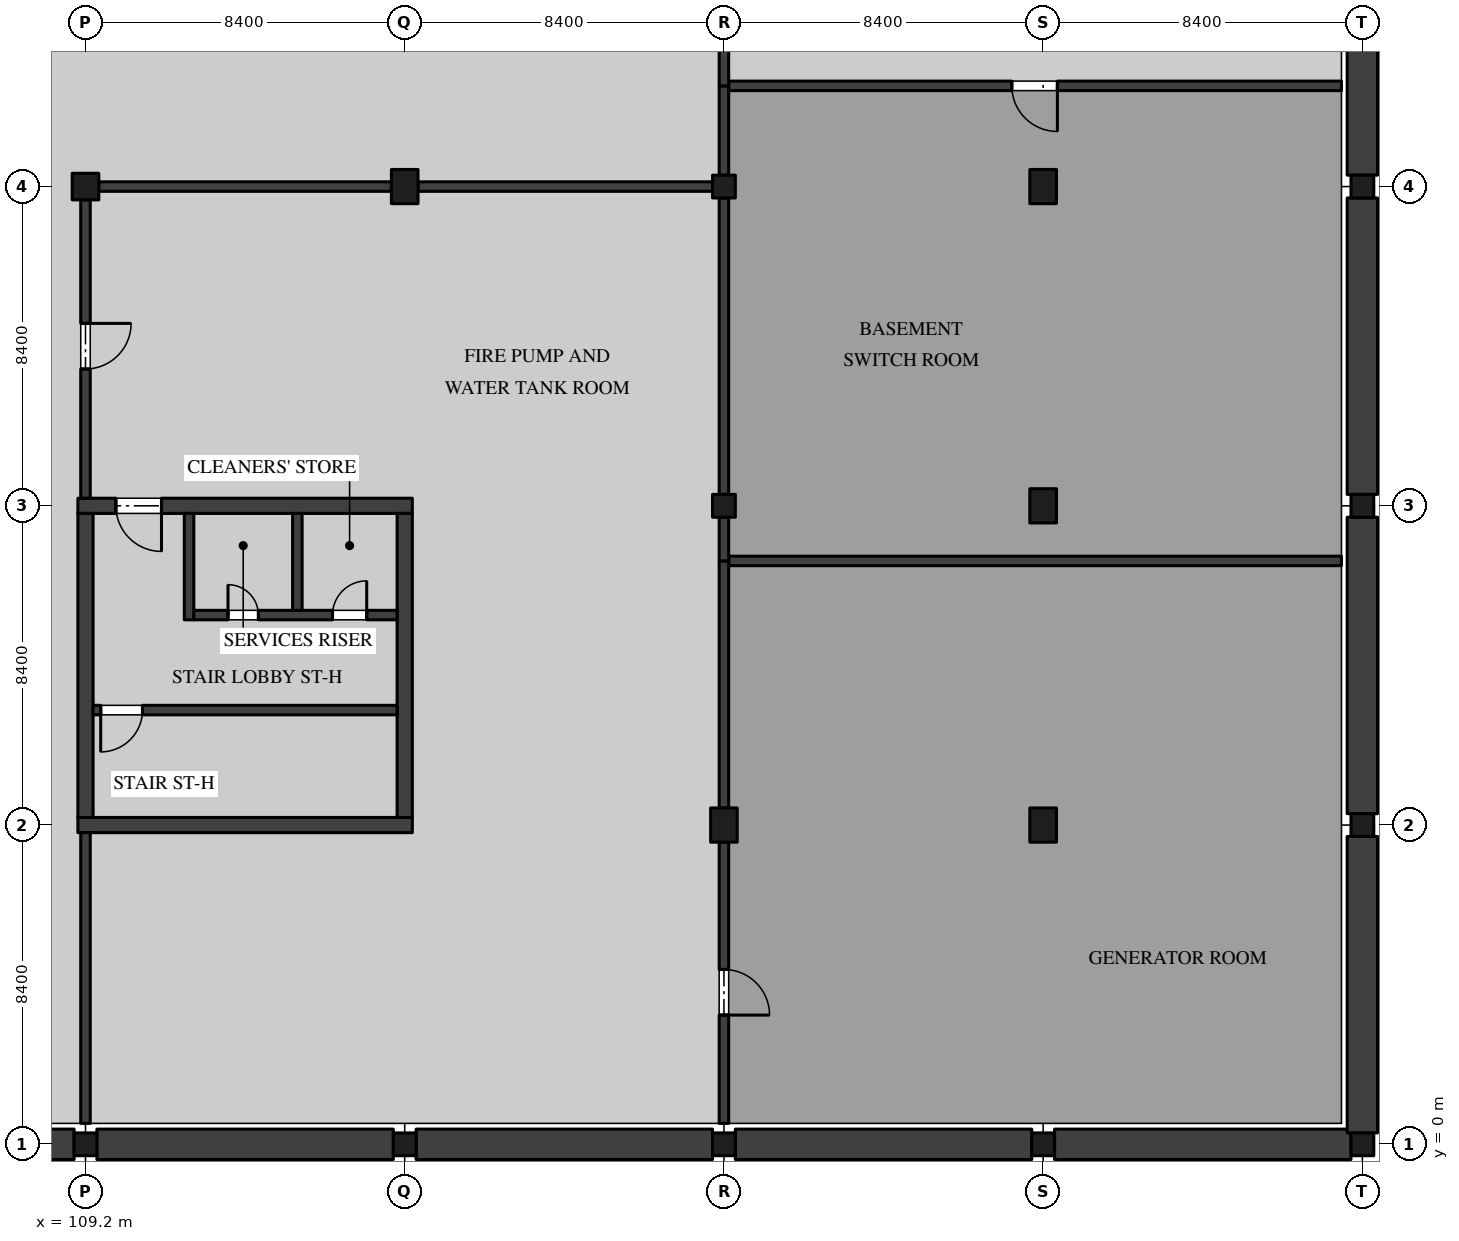
"""IFC4 building model, lengths in metres.
Left out: names, types, materials, properties, quantities, classifications, styles, units other than length and angle.
Written with IfcOpenShell. Run it as: python <this file> out.ifc"""

import sys

from ifc_helpers import new_model, si_unit, direction, frame, frame_2d, origin, origin_2d, place, context, subcontext, project, spatial, rectangle, extrude, element, fill, save


model = new_model("IFC4")
c1 = context("Model", 3, precision=1e-05, world=origin(), true_north=direction((0.0, 1.0)))
c2 = subcontext(c1, "Body", "Model", "MODEL_VIEW")
j1 = project(units=[si_unit("LENGTHUNIT", "METRE"), si_unit("PLANEANGLEUNIT", "RADIAN")], contexts=[c1])
p1 = place(None, origin())
s1 = spatial("IfcSite", under=j1, at=p1, CompositionType="ELEMENT")
p2 = place(p1, origin())
s2 = spatial("IfcBuilding", under=s1, at=p2, CompositionType="ELEMENT")
p3 = place(p2, frame((0.0, 0.0, -4.5)))
s3 = spatial("IfcBuildingStorey", under=s2, at=p3, CompositionType="ELEMENT", Elevation=-4.5)
p4 = place(p3, frame((109.2, 0.0, 0.0), z_axis=(0.0, 0.0, 1.0), x_axis=(1.0, 0.0, 0.0)))
e1 = element("IfcColumn", 1, at=p4, inside=s3, PredefinedType="COLUMN", context=c2, shape_type="SweptSolid", body=[
    extrude(rectangle(XDim=0.6, YDim=0.6, at=origin_2d()), origin(), (0.0, 0.0, 1.0), 4.05),
])
p5 = place(p3, frame((109.2, 25.2, 0.0), z_axis=(0.0, 0.0, 1.0), x_axis=(1.0, 0.0, 0.0)))
e2 = element("IfcColumn", 2, at=p5, inside=s3, PredefinedType="COLUMN", context=c2, shape_type="SweptSolid", body=[
    extrude(rectangle(XDim=0.7, YDim=0.7, at=origin_2d()), origin(), (0.0, 0.0, 1.0), 4.05),
])
p6 = place(p3, frame((117.6, 0.0, 0.0), z_axis=(0.0, 0.0, 1.0), x_axis=(1.0, 0.0, 0.0)))
e3 = element("IfcColumn", 3, at=p6, inside=s3, PredefinedType="COLUMN", context=c2, shape_type="SweptSolid", body=[
    extrude(rectangle(XDim=0.6, YDim=0.6, at=origin_2d()), origin(), (0.0, 0.0, 1.0), 4.05),
])
p7 = place(p3, frame((117.6, 25.2, 0.0), z_axis=(0.0, 0.0, 1.0), x_axis=(1.0, 0.0, 0.0)))
e4 = element("IfcColumn", 4, at=p7, inside=s3, PredefinedType="COLUMN", context=c2, shape_type="SweptSolid", body=[
    extrude(rectangle(XDim=0.7, YDim=0.9, at=origin_2d()), origin(), (0.0, 0.0, 1.0), 4.05),
])
p8 = place(p3, frame((126.0, 0.0, 0.0), z_axis=(0.0, 0.0, 1.0), x_axis=(1.0, 0.0, 0.0)))
e5 = element("IfcColumn", 5, at=p8, inside=s3, PredefinedType="COLUMN", context=c2, shape_type="SweptSolid", body=[
    extrude(rectangle(XDim=0.6, YDim=0.6, at=origin_2d()), origin(), (0.0, 0.0, 1.0), 4.05),
])
p9 = place(p3, frame((126.0, 8.4, 0.0), z_axis=(0.0, 0.0, 1.0), x_axis=(1.0, 0.0, 0.0)))
e6 = element("IfcColumn", 6, at=p9, inside=s3, PredefinedType="COLUMN", context=c2, shape_type="SweptSolid", body=[
    extrude(rectangle(XDim=0.7, YDim=0.9, at=origin_2d()), origin(), (0.0, 0.0, 1.0), 4.05),
])
for number, where, z_axis, x_axis in (
    (7, (126.0, 16.8, 0.0), (0.0, 0.0, 1.0), (1.0, 0.0, 0.0)),
    (8, (126.0, 25.2, 0.0), (0.0, 0.0, 1.0), (1.0, 0.0, 0.0)),
    (9, (134.4, 0.0, 0.0), (0.0, 0.0, 1.0), (1.0, 0.0, 0.0)),
):
    element("IfcColumn", number, at=place(p3, frame(where, z_axis=z_axis, x_axis=x_axis)), inside=s3, PredefinedType="COLUMN", context=c2, shape_type="SweptSolid", body=[
        extrude(rectangle(XDim=0.6, YDim=0.6, at=origin_2d()), origin(), (0.0, 0.0, 1.0), 4.05),
    ])
for number, where, z_axis, x_axis in (
    (10, (134.4, 8.4, 0.0), (0.0, 0.0, 1.0), (1.0, 0.0, 0.0)),
    (11, (134.4, 16.8, 0.0), (0.0, 0.0, 1.0), (1.0, 0.0, 0.0)),
    (12, (134.4, 25.2, 0.0), (0.0, 0.0, 1.0), (1.0, 0.0, 0.0)),
):
    element("IfcColumn", number, at=place(p3, frame(where, z_axis=z_axis, x_axis=x_axis)), inside=s3, PredefinedType="COLUMN", context=c2, shape_type="SweptSolid", body=[
        extrude(rectangle(XDim=0.7, YDim=0.9, at=origin_2d()), origin(), (0.0, 0.0, 1.0), 4.05),
    ])
for number, where, z_axis, x_axis in (
    (13, (142.8, 0.0, 0.0), (0.0, 0.0, 1.0), (1.0, 0.0, 0.0)),
    (14, (142.8, 8.4, 0.0), (0.0, 0.0, 1.0), (1.0, 0.0, 0.0)),
    (15, (142.8, 16.8, 0.0), (0.0, 0.0, 1.0), (1.0, 0.0, 0.0)),
    (16, (142.8, 25.2, 0.0), (0.0, 0.0, 1.0), (1.0, 0.0, 0.0)),
):
    element("IfcColumn", number, at=place(p3, frame(where, z_axis=z_axis, x_axis=x_axis)), inside=s3, PredefinedType="COLUMN", context=c2, shape_type="SweptSolid", body=[
        extrude(rectangle(XDim=0.6, YDim=0.6, at=origin_2d()), origin(), (0.0, 0.0, 1.0), 4.05),
    ])
p10 = place(p3, frame((101.1, 0.0, 0.0), z_axis=(0.0, 0.0, 1.0), x_axis=(1.0, 0.0, 0.0)))
e17 = element("IfcWall", 17, at=p10, inside=s3, PredefinedType="SOLIDWALL", context=c2, shape_type="SweptSolid", body=[
    extrude(rectangle(XDim=7.8, YDim=0.8, at=frame_2d((3.9, 0.0))), origin(), (0.0, 0.0, 1.0), 4.05),
])
for number, where, z_axis, x_axis in (
    (18, (109.5, 0.0, 0.0), (0.0, 0.0, 1.0), (1.0, 0.0, 0.0)),
    (19, (117.9, 0.0, 0.0), (0.0, 0.0, 1.0), (1.0, 0.0, 0.0)),
    (20, (126.3, 0.0, 0.0), (0.0, 0.0, 1.0), (1.0, 0.0, 0.0)),
    (21, (134.7, 0.0, 0.0), (0.0, 0.0, 1.0), (1.0, 0.0, 0.0)),
    (22, (142.8, 0.3, 0.0), (0.0, 0.0, 1.0), (0.0, 1.0, 0.0)),
    (23, (142.8, 8.7, 0.0), (0.0, 0.0, 1.0), (0.0, 1.0, 0.0)),
):
    element("IfcWall", number, at=place(p3, frame(where, z_axis=z_axis, x_axis=x_axis)), inside=s3, PredefinedType="SOLIDWALL", context=c2, shape_type="SweptSolid", body=[
        extrude(rectangle(XDim=7.8, YDim=0.8, at=frame_2d((3.9, 0.0))), origin(), (0.0, 0.0, 1.0), 4.05),
    ])
p11 = place(p3, frame((142.8, 17.1, 0.0), z_axis=(0.0, 0.0, 1.0), x_axis=(0.0, 1.0, 0.0)))
e24 = element("IfcWall", 24, at=p11, inside=s3, PredefinedType="SOLIDWALL", context=c2, shape_type="SweptSolid", body=[
    extrude(rectangle(XDim=7.8, YDim=0.8, at=frame_2d((3.9, 0.0))), origin(), (0.0, 0.0, 1.0), 4.05),
])
p12 = place(p3, frame((142.8, 25.5, 0.0), z_axis=(0.0, 0.0, 1.0), x_axis=(0.0, 1.0, 0.0)))
e25 = element("IfcWall", 25, at=p12, inside=s3, PredefinedType="SOLIDWALL", context=c2, shape_type="SweptSolid", body=[
    extrude(rectangle(XDim=7.8, YDim=0.8, at=frame_2d((3.9, 0.0))), origin(), (0.0, 0.0, 1.0), 4.05),
])
p13 = place(p3, frame((109.0, 8.4, 0.0), z_axis=(0.0, 0.0, 1.0), x_axis=(1.0, 0.0, 0.0)))
e26 = element("IfcWall", 26, at=p13, inside=s3, PredefinedType="SHEAR", context=c2, shape_type="SweptSolid", body=[
    extrude(rectangle(XDim=8.8, YDim=0.4, at=frame_2d((4.4, 0.0))), origin(), (0.0, 0.0, 1.0), 4.05),
])
p14 = place(p3, frame((109.0, 16.8, 0.0), z_axis=(0.0, 0.0, 1.0), x_axis=(1.0, 0.0, 0.0)))
e27 = element("IfcWall", 27, at=p14, inside=s3, PredefinedType="SHEAR", context=c2, shape_type="SweptSolid", body=[
    extrude(rectangle(XDim=8.8, YDim=0.4, at=frame_2d((4.4, 0.0))), origin(), (0.0, 0.0, 1.0), 4.05),
])
p15 = place(p14, frame((1.0, 0.0, 0.0)))
e28 = element("IfcOpeningElement", 28, at=p15, cuts=e27, PredefinedType="OPENING", context=c2, shape_type="SweptSolid", body=[
    extrude(rectangle(XDim=1.2, YDim=2.1, at=frame_2d((0.6, 1.05))), frame((0.0, 0.21, 0.0), z_axis=(0.0, -1.0, 0.0), x_axis=(1.0, 0.0, 0.0)), (0.0, 0.0, 1.0), 0.42),
])
for number, where, z_axis, x_axis in (
    (29, (109.2, 8.6, 0.0), (0.0, 0.0, 1.0), (0.0, 1.0, 0.0)),
    (30, (117.6, 8.6, 0.0), (0.0, 0.0, 1.0), (0.0, 1.0, 0.0)),
):
    element("IfcWall", number, at=place(p3, frame(where, z_axis=z_axis, x_axis=x_axis)), inside=s3, PredefinedType="SHEAR", context=c2, shape_type="SweptSolid", body=[
        extrude(rectangle(XDim=8.0, YDim=0.4, at=frame_2d((4.0, 0.0))), origin(), (0.0, 0.0, 1.0), 4.05),
    ])
p16 = place(p3, frame((109.4, 11.425, 0.0), z_axis=(0.0, 0.0, 1.0), x_axis=(1.0, 0.0, 0.0)))
e31 = element("IfcWall", 31, at=p16, inside=s3, PredefinedType="SOLIDWALL", context=c2, shape_type="SweptSolid", body=[
    extrude(rectangle(XDim=8.0, YDim=0.25, at=frame_2d((4.0, 0.0))), origin(), (0.0, 0.0, 1.0), 4.05),
])
p17 = place(p16, frame((0.2, 0.0, 0.0)))
e32 = element("IfcOpeningElement", 32, at=p17, cuts=e31, PredefinedType="OPENING", context=c2, shape_type="SweptSolid", body=[
    extrude(rectangle(XDim=1.1, YDim=2.1, at=frame_2d((0.55, 1.05))), frame((0.0, 0.135, 0.0), z_axis=(0.0, -1.0, 0.0), x_axis=(1.0, 0.0, 0.0)), (0.0, 0.0, 1.0), 0.27),
])
p18 = place(p3, frame((111.925, 13.8, 0.0), z_axis=(0.0, 0.0, 1.0), x_axis=(0.0, 1.0, 0.0)))
e33 = element("IfcWall", 33, at=p18, inside=s3, PredefinedType="SOLIDWALL", context=c2, shape_type="SweptSolid", body=[
    extrude(rectangle(XDim=2.8, YDim=0.25, at=frame_2d((1.4, 0.0))), origin(), (0.0, 0.0, 1.0), 4.05),
])
p19 = place(p3, frame((112.05, 13.925, 0.0), z_axis=(0.0, 0.0, 1.0), x_axis=(1.0, 0.0, 0.0)))
e34 = element("IfcWall", 34, at=p19, inside=s3, PredefinedType="SOLIDWALL", context=c2, shape_type="SweptSolid", body=[
    extrude(rectangle(XDim=5.35, YDim=0.25, at=frame_2d((2.675, 0.0))), origin(), (0.0, 0.0, 1.0), 4.05),
])
p20 = place(p19, frame((3.65, 0.0, 0.0)))
e35 = element("IfcOpeningElement", 35, at=p20, cuts=e34, PredefinedType="OPENING", context=c2, shape_type="SweptSolid", body=[
    extrude(rectangle(XDim=0.9, YDim=2.1, at=frame_2d((0.45, 1.05))), frame((0.0, 0.135, 0.0), z_axis=(0.0, -1.0, 0.0), x_axis=(1.0, 0.0, 0.0)), (0.0, 0.0, 1.0), 0.27),
])
p21 = place(p19, frame((0.9, 0.0, 0.0)))
e36 = element("IfcOpeningElement", 36, at=p21, cuts=e34, PredefinedType="OPENING", context=c2, shape_type="SweptSolid", body=[
    extrude(rectangle(XDim=0.8, YDim=2.1, at=frame_2d((0.4, 1.05))), frame((0.0, 0.135, 0.0), z_axis=(0.0, -1.0, 0.0), x_axis=(1.0, 0.0, 0.0)), (0.0, 0.0, 1.0), 0.27),
])
p22 = place(p3, frame((114.775, 14.05, 0.0), z_axis=(0.0, 0.0, 1.0), x_axis=(0.0, 1.0, 0.0)))
e37 = element("IfcWall", 37, at=p22, inside=s3, PredefinedType="SOLIDWALL", context=c2, shape_type="SweptSolid", body=[
    extrude(rectangle(XDim=2.55, YDim=0.25, at=frame_2d((1.275, 0.0))), origin(), (0.0, 0.0, 1.0), 4.05),
])
p23 = place(p3, frame((126.125, 15.35, 0.0), z_axis=(0.0, 0.0, 1.0), x_axis=(1.0, 0.0, 0.0)))
e38 = element("IfcWall", 38, at=p23, inside=s3, PredefinedType="PARTITIONING", context=c2, shape_type="SweptSolid", body=[
    extrude(rectangle(XDim=16.125, YDim=0.25, at=frame_2d((8.062, 0.0))), origin(), (0.0, 0.0, 1.0), 4.05),
])
p24 = place(p3, frame((126.0, 0.55, 0.0), z_axis=(0.0, 0.0, 1.0), x_axis=(0.0, 1.0, 0.0)))
e39 = element("IfcWall", 39, at=p24, inside=s3, PredefinedType="PARTITIONING", context=c2, shape_type="SweptSolid", body=[
    extrude(rectangle(XDim=7.4, YDim=0.25, at=frame_2d((3.7, 0.0))), origin(), (0.0, 0.0, 1.0), 4.05),
])
p25 = place(p24, frame((2.85, 0.0, 0.0)))
e40 = element("IfcOpeningElement", 40, at=p25, cuts=e39, PredefinedType="OPENING", context=c2, shape_type="SweptSolid", body=[
    extrude(rectangle(XDim=1.2, YDim=2.1, at=frame_2d((0.6, 1.05))), frame((0.0, 0.135, 0.0), z_axis=(0.0, -1.0, 0.0), x_axis=(1.0, 0.0, 0.0)), (0.0, 0.0, 1.0), 0.27),
])
p26 = place(p3, frame((126.0, 8.85, 0.0), z_axis=(0.0, 0.0, 1.0), x_axis=(0.0, 1.0, 0.0)))
e41 = element("IfcWall", 41, at=p26, inside=s3, PredefinedType="PARTITIONING", context=c2, shape_type="SweptSolid", body=[
    extrude(rectangle(XDim=6.5, YDim=0.25, at=frame_2d((3.25, 0.0))), origin(), (0.0, 0.0, 1.0), 4.05),
])
p27 = place(p3, frame((126.125, 27.85, 0.0), z_axis=(0.0, 0.0, 1.0), x_axis=(1.0, 0.0, 0.0)))
e42 = element("IfcWall", 42, at=p27, inside=s3, PredefinedType="PARTITIONING", context=c2, shape_type="SweptSolid", body=[
    extrude(rectangle(XDim=16.125, YDim=0.25, at=frame_2d((8.062, 0.0))), origin(), (0.0, 0.0, 1.0), 4.05),
])
p28 = place(p27, frame((7.45, 0.0, 0.0)))
e43 = element("IfcOpeningElement", 43, at=p28, cuts=e42, PredefinedType="OPENING", context=c2, shape_type="SweptSolid", body=[
    extrude(rectangle(XDim=1.2, YDim=2.1, at=frame_2d((0.6, 1.05))), frame((0.0, 0.135, 0.0), z_axis=(0.0, -1.0, 0.0), x_axis=(1.0, 0.0, 0.0)), (0.0, 0.0, 1.0), 0.27),
])
p29 = place(p3, frame((126.0, 15.35, 0.0), z_axis=(0.0, 0.0, 1.0), x_axis=(0.0, 1.0, 0.0)))
e44 = element("IfcWall", 44, at=p29, inside=s3, PredefinedType="PARTITIONING", context=c2, shape_type="SweptSolid", body=[
    extrude(rectangle(XDim=1.15, YDim=0.25, at=frame_2d((0.575, 0.0))), origin(), (0.0, 0.0, 1.0), 4.05),
])
p30 = place(p3, frame((126.0, 17.1, 0.0), z_axis=(0.0, 0.0, 1.0), x_axis=(0.0, 1.0, 0.0)))
e45 = element("IfcWall", 45, at=p30, inside=s3, PredefinedType="PARTITIONING", context=c2, shape_type="SweptSolid", body=[
    extrude(rectangle(XDim=7.8, YDim=0.25, at=frame_2d((3.9, 0.0))), origin(), (0.0, 0.0, 1.0), 4.05),
])
p31 = place(p3, frame((126.0, 25.5, 0.0), z_axis=(0.0, 0.0, 1.0), x_axis=(0.0, 1.0, 0.0)))
e46 = element("IfcWall", 46, at=p31, inside=s3, PredefinedType="PARTITIONING", context=c2, shape_type="SweptSolid", body=[
    extrude(rectangle(XDim=2.35, YDim=0.25, at=frame_2d((1.175, 0.0))), origin(), (0.0, 0.0, 1.0), 4.05),
])
p32 = place(p3, frame((126.0, 27.85, 0.0), z_axis=(0.0, 0.0, 1.0), x_axis=(0.0, 1.0, 0.0)))
e47 = element("IfcWall", 47, at=p32, inside=s3, PredefinedType="PARTITIONING", context=c2, shape_type="SweptSolid", body=[
    extrude(rectangle(XDim=5.2, YDim=0.25, at=frame_2d((2.6, 0.0))), origin(), (0.0, 0.0, 1.0), 4.05),
])
p33 = place(p3, frame((109.2, 0.55, 0.0), z_axis=(0.0, 0.0, 1.0), x_axis=(0.0, 1.0, 0.0)))
e48 = element("IfcWall", 48, at=p33, inside=s3, PredefinedType="PARTITIONING", context=c2, shape_type="SweptSolid", body=[
    extrude(rectangle(XDim=7.65, YDim=0.25, at=frame_2d((3.825, 0.0))), origin(), (0.0, 0.0, 1.0), 4.05),
])
p34 = place(p3, frame((109.2, 17.0, 0.0), z_axis=(0.0, 0.0, 1.0), x_axis=(0.0, 1.0, 0.0)))
e49 = element("IfcWall", 49, at=p34, inside=s3, PredefinedType="PARTITIONING", context=c2, shape_type="SweptSolid", body=[
    extrude(rectangle(XDim=7.85, YDim=0.25, at=frame_2d((3.925, 0.0))), origin(), (0.0, 0.0, 1.0), 4.05),
])
p35 = place(p34, frame((3.4, 0.0, 0.0)))
e50 = element("IfcOpeningElement", 50, at=p35, cuts=e49, PredefinedType="OPENING", context=c2, shape_type="SweptSolid", body=[
    extrude(rectangle(XDim=1.2, YDim=2.1, at=frame_2d((0.6, 1.05))), frame((0.0, 0.135, 0.0), z_axis=(0.0, -1.0, 0.0), x_axis=(1.0, 0.0, 0.0)), (0.0, 0.0, 1.0), 0.27),
])
p36 = place(p3, frame((109.55, 25.2, 0.0), z_axis=(0.0, 0.0, 1.0), x_axis=(1.0, 0.0, 0.0)))
e51 = element("IfcWall", 51, at=p36, inside=s3, PredefinedType="PARTITIONING", context=c2, shape_type="SweptSolid", body=[
    extrude(rectangle(XDim=7.7, YDim=0.25, at=frame_2d((3.85, 0.0))), origin(), (0.0, 0.0, 1.0), 4.05),
])
p37 = place(p3, frame((117.95, 25.2, 0.0), z_axis=(0.0, 0.0, 1.0), x_axis=(1.0, 0.0, 0.0)))
e52 = element("IfcWall", 52, at=p37, inside=s3, PredefinedType="PARTITIONING", context=c2, shape_type="SweptSolid", body=[
    extrude(rectangle(XDim=7.75, YDim=0.25, at=frame_2d((3.875, 0.0))), origin(), (0.0, 0.0, 1.0), 4.05),
])
p38 = place(p20, origin())
e53 = element("IfcDoor", 53, at=p38, inside=s3, OperationType="SINGLE_SWING_LEFT", PredefinedType="DOOR", context=c2, shape_type="SweptSolid", body=[
    extrude(rectangle(XDim=0.9, YDim=2.1, at=frame_2d((0.45, 1.05))), frame((0.0, 0.035, 0.0), z_axis=(0.0, -1.0, 0.0), x_axis=(1.0, 0.0, 0.0)), (0.0, 0.0, 1.0), 0.07),
])
fill(e35, e53)
p39 = place(p15, frame((1.2, 0.0, 0.0), z_axis=(0.0, 0.0, 1.0), x_axis=(-1.0, 0.0, 0.0)))
e54 = element("IfcDoor", 54, at=p39, inside=s3, OperationType="SINGLE_SWING_RIGHT", PredefinedType="DOOR", context=c2, shape_type="SweptSolid", body=[
    extrude(rectangle(XDim=1.2, YDim=2.1, at=frame_2d((0.6, 1.05))), frame((0.0, 0.035, 0.0), z_axis=(0.0, -1.0, 0.0), x_axis=(1.0, 0.0, 0.0)), (0.0, 0.0, 1.0), 0.07),
])
fill(e28, e54)
p40 = place(p21, origin())
e55 = element("IfcDoor", 55, at=p40, inside=s3, OperationType="SINGLE_SWING_RIGHT", PredefinedType="DOOR", context=c2, shape_type="SweptSolid", body=[
    extrude(rectangle(XDim=0.8, YDim=2.1, at=frame_2d((0.4, 1.05))), frame((0.0, 0.035, 0.0), z_axis=(0.0, -1.0, 0.0), x_axis=(1.0, 0.0, 0.0)), (0.0, 0.0, 1.0), 0.07),
])
fill(e36, e55)
p41 = place(p17, frame((1.1, 0.0, 0.0), z_axis=(0.0, 0.0, 1.0), x_axis=(-1.0, 0.0, 0.0)))
e56 = element("IfcDoor", 56, at=p41, inside=s3, OperationType="SINGLE_SWING_LEFT", PredefinedType="DOOR", context=c2, shape_type="SweptSolid", body=[
    extrude(rectangle(XDim=1.1, YDim=2.1, at=frame_2d((0.55, 1.05))), frame((0.0, 0.035, 0.0), z_axis=(0.0, -1.0, 0.0), x_axis=(1.0, 0.0, 0.0)), (0.0, 0.0, 1.0), 0.07),
])
fill(e32, e56)
p42 = place(p25, frame((1.2, 0.0, 0.0), z_axis=(0.0, 0.0, 1.0), x_axis=(-1.0, 0.0, 0.0)))
e57 = element("IfcDoor", 57, at=p42, inside=s3, OperationType="SINGLE_SWING_LEFT", PredefinedType="DOOR", context=c2, shape_type="SweptSolid", body=[
    extrude(rectangle(XDim=1.2, YDim=2.1, at=frame_2d((0.6, 1.05))), frame((0.0, 0.05, 0.0), z_axis=(0.0, -1.0, 0.0), x_axis=(1.0, 0.0, 0.0)), (0.0, 0.0, 1.0), 0.1),
])
fill(e40, e57)
p43 = place(p28, frame((1.2, 0.0, 0.0), z_axis=(0.0, 0.0, 1.0), x_axis=(-1.0, 0.0, 0.0)))
e58 = element("IfcDoor", 58, at=p43, inside=s3, OperationType="SINGLE_SWING_RIGHT", PredefinedType="DOOR", context=c2, shape_type="SweptSolid", body=[
    extrude(rectangle(XDim=1.2, YDim=2.1, at=frame_2d((0.6, 1.05))), frame((0.0, 0.05, 0.0), z_axis=(0.0, -1.0, 0.0), x_axis=(1.0, 0.0, 0.0)), (0.0, 0.0, 1.0), 0.1),
])
fill(e43, e58)
p44 = place(p35, frame((1.2, 0.0, 0.0), z_axis=(0.0, 0.0, 1.0), x_axis=(-1.0, 0.0, 0.0)))
e59 = element("IfcDoor", 59, at=p44, inside=s3, OperationType="SINGLE_SWING_RIGHT", PredefinedType="DOOR", context=c2, shape_type="SweptSolid", body=[
    extrude(rectangle(XDim=1.2, YDim=2.1, at=frame_2d((0.6, 1.05))), frame((0.0, 0.05, 0.0), z_axis=(0.0, -1.0, 0.0), x_axis=(1.0, 0.0, 0.0)), (0.0, 0.0, 1.0), 0.1),
])
fill(e50, e59)
save(model, sys.argv[1])
